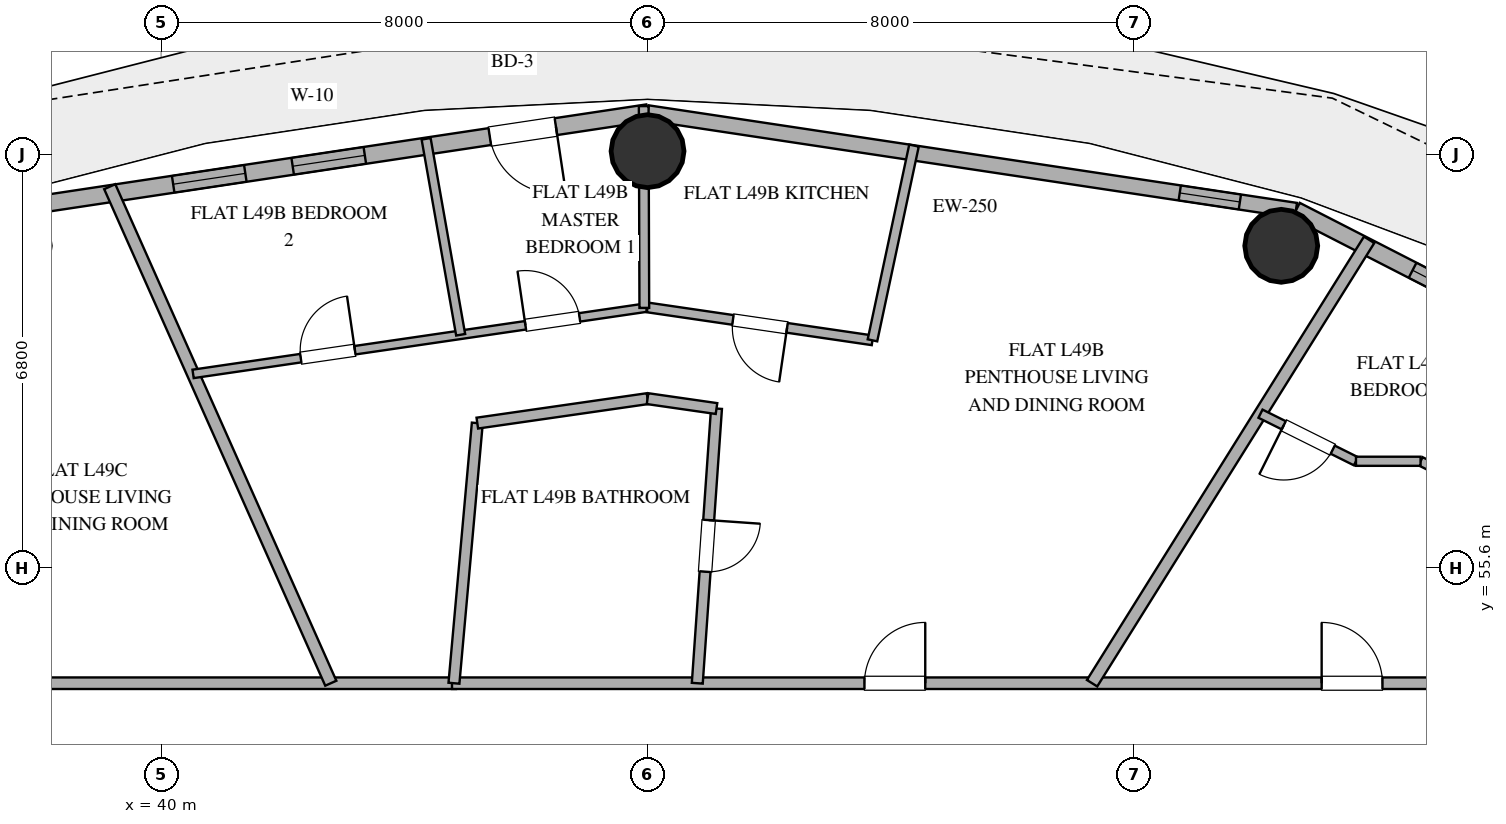
"""IFC4 building model, lengths in metres.
Left out: names, types, materials, properties, quantities, classifications, styles, units other than length and angle.
Written with IfcOpenShell. Run it as: python <this file> out.ifc"""

import sys

from ifc_helpers import new_model, si_unit, direction, frame, frame_2d, origin, origin_2d, place, context, subcontext, project, spatial, rectangle, hollow_circle, extrude, element, fill, save


model = new_model("IFC4")
c1 = context("Model", 3, precision=1e-05, world=origin(), true_north=direction((0.0, 1.0)))
c2 = subcontext(c1, "Body", "Model", "MODEL_VIEW")
j1 = project(units=[si_unit("LENGTHUNIT", "METRE"), si_unit("PLANEANGLEUNIT", "RADIAN")], contexts=[c1])
p1 = place(None, origin())
s1 = spatial("IfcSite", under=j1, at=p1, CompositionType="ELEMENT")
p2 = place(p1, origin())
s2 = spatial("IfcBuilding", under=s1, at=p2, CompositionType="ELEMENT")
p3 = place(p2, frame((0.0, 0.0, 193.8)))
s3 = spatial("IfcBuildingStorey", under=s2, at=p3, CompositionType="ELEMENT", Elevation=193.8)
for number, where, z_axis, x_axis in (
    (1, (58.422, 60.893, 0.0), (0.0, 0.0, 1.0), (1.0, 0.0, 0.0)),
    (2, (48.0, 62.45, 0.0), (0.0, 0.0, 1.0), (1.0, 0.0, 0.0)),
):
    element("IfcColumn", number, at=place(p3, frame(where, z_axis=z_axis, x_axis=x_axis)), inside=s3, PredefinedType="COLUMN", context=c2, shape_type="SweptSolid", body=[
        extrude(hollow_circle(Radius=0.6, WallThickness=0.032, at=origin_2d()), origin(), (0.0, 0.0, 1.0), 3.38),
    ])
p4 = place(p3, frame((67.576, 56.906, 0.0), z_axis=(0.0, 0.0, 1.0), x_axis=(-0.889872523182, 0.456209263919, 0.0)))
e3 = element("IfcWall", 3, at=p4, inside=s3, PredefinedType="SOLIDWALL", context=c2, shape_type="SweptSolid", body=[
    extrude(rectangle(XDim=10.016, YDim=0.28, at=frame_2d((5.008, 0.0))), origin(), (0.0, 0.0, 1.0), 3.38),
])
p5 = place(p4, frame((1.76, 0.0, 0.85)))
e4 = element("IfcOpeningElement", 4, at=p5, cuts=e3, PredefinedType="OPENING", context=c2, shape_type="SweptSolid", body=[
    extrude(rectangle(XDim=1.5, YDim=1.8, at=frame_2d((0.75, 0.9))), frame((0.0, 0.15, 0.0), z_axis=(0.0, -1.0, 0.0), x_axis=(1.0, 0.0, 0.0)), (0.0, 0.0, 1.0), 0.3),
])
p6 = place(p4, frame((4.545, 0.0, 0.85)))
e5 = element("IfcOpeningElement", 5, at=p6, cuts=e3, PredefinedType="OPENING", context=c2, shape_type="SweptSolid", body=[
    extrude(rectangle(XDim=1.35, YDim=1.8, at=frame_2d((0.675, 0.9))), frame((0.0, 0.15, 0.0), z_axis=(0.0, -1.0, 0.0), x_axis=(1.0, 0.0, 0.0)), (0.0, 0.0, 1.0), 0.3),
])
p7 = place(p4, frame((6.51, 0.0, 0.85)))
e6 = element("IfcOpeningElement", 6, at=p7, cuts=e3, PredefinedType="OPENING", context=c2, shape_type="SweptSolid", body=[
    extrude(rectangle(XDim=1.35, YDim=1.8, at=frame_2d((0.675, 0.9))), frame((0.0, 0.15, 0.0), z_axis=(0.0, -1.0, 0.0), x_axis=(1.0, 0.0, 0.0)), (0.0, 0.0, 1.0), 0.3),
])
p8 = place(p3, frame((58.663, 61.475, 0.0), z_axis=(0.0, 0.0, 1.0), x_axis=(-0.988863993413, 0.148822049884, 0.0)))
e7 = element("IfcWall", 7, at=p8, inside=s3, PredefinedType="SOLIDWALL", context=c2, shape_type="SweptSolid", body=[
    extrude(rectangle(XDim=10.783, YDim=0.25, at=frame_2d((5.392, 0.0))), origin(), (0.0, 0.0, 1.0), 3.38),
])
p9 = place(p8, frame((0.932, 0.0, 0.35)))
e8 = element("IfcOpeningElement", 8, at=p9, cuts=e7, PredefinedType="OPENING", context=c2, shape_type="SweptSolid", body=[
    extrude(rectangle(XDim=1.0, YDim=1.05, at=frame_2d((0.5, 0.525))), frame((0.0, 0.135, 0.0), z_axis=(0.0, -1.0, 0.0), x_axis=(1.0, 0.0, 0.0)), (0.0, 0.0, 1.0), 0.27),
])
p10 = place(p3, frame((48.0, 63.08, 0.0), z_axis=(0.0, 0.0, 1.0), x_axis=(-0.988863993413, -0.148822049884, 0.0)))
e9 = element("IfcWall", 9, at=p10, inside=s3, PredefinedType="SOLIDWALL", context=c2, shape_type="SweptSolid", body=[
    extrude(rectangle(XDim=10.783, YDim=0.28, at=frame_2d((5.392, 0.0))), origin(), (0.0, 0.0, 1.0), 3.38),
])
p11 = place(p10, frame((1.524, 0.0, 0.0)))
e10 = element("IfcOpeningElement", 10, at=p11, cuts=e9, PredefinedType="OPENING", context=c2, shape_type="SweptSolid", body=[
    extrude(rectangle(XDim=1.1, YDim=2.25, at=frame_2d((0.55, 1.125))), frame((0.0, 0.15, 0.0), z_axis=(0.0, -1.0, 0.0), x_axis=(1.0, 0.0, 0.0)), (0.0, 0.0, 1.0), 0.3),
])
p12 = place(p10, frame((4.702, 0.0, 0.85)))
e11 = element("IfcOpeningElement", 11, at=p12, cuts=e9, PredefinedType="OPENING", context=c2, shape_type="SweptSolid", body=[
    extrude(rectangle(XDim=1.2, YDim=1.6, at=frame_2d((0.6, 0.8))), frame((0.0, 0.15, 0.0), z_axis=(0.0, -1.0, 0.0), x_axis=(1.0, 0.0, 0.0)), (0.0, 0.0, 1.0), 0.3),
])
p13 = place(p10, frame((6.69, 0.0, 0.85)))
e12 = element("IfcOpeningElement", 12, at=p13, cuts=e9, PredefinedType="OPENING", context=c2, shape_type="SweptSolid", body=[
    extrude(rectangle(XDim=1.2, YDim=1.6, at=frame_2d((0.6, 0.8))), frame((0.0, 0.15, 0.0), z_axis=(0.0, -1.0, 0.0), x_axis=(1.0, 0.0, 0.0)), (0.0, 0.0, 1.0), 0.3),
])
p14 = place(p3, frame((32.1, 53.7, 0.0), z_axis=(0.0, 0.0, 1.0), x_axis=(1.0, 0.0, 0.0)))
e13 = element("IfcWall", 13, at=p14, inside=s3, PredefinedType="PARTITIONING", context=c2, shape_type="SweptSolid", body=[
    extrude(rectangle(XDim=12.748, YDim=0.19, at=frame_2d((6.374, 0.0))), origin(), (0.0, 0.0, 1.0), 2.74),
])
p15 = place(p14, frame((4.863, 0.0, 0.0)))
e14 = element("IfcOpeningElement", 14, at=p15, cuts=e13, PredefinedType="OPENING", context=c2, shape_type="SweptSolid", body=[
    extrude(rectangle(XDim=1.0, YDim=2.2, at=frame_2d((0.5, 1.1))), frame((0.0, 0.105, 0.0), z_axis=(0.0, -1.0, 0.0), x_axis=(1.0, 0.0, 0.0)), (0.0, 0.0, 1.0), 0.21),
])
p16 = place(p3, frame((44.784, 53.7, 0.0), z_axis=(0.0, 0.0, 1.0), x_axis=(1.0, 0.0, 0.0)))
e15 = element("IfcWall", 15, at=p16, inside=s3, PredefinedType="PARTITIONING", context=c2, shape_type="SweptSolid", body=[
    extrude(rectangle(XDim=19.116, YDim=0.19, at=frame_2d((9.558, 0.0))), origin(), (0.0, 0.0, 1.0), 2.74),
])
p17 = place(p16, frame((14.302, 0.0, 0.0)))
e16 = element("IfcOpeningElement", 16, at=p17, cuts=e15, PredefinedType="OPENING", context=c2, shape_type="SweptSolid", body=[
    extrude(rectangle(XDim=1.0, YDim=2.2, at=frame_2d((0.5, 1.1))), frame((0.0, 0.105, 0.0), z_axis=(0.0, -1.0, 0.0), x_axis=(1.0, 0.0, 0.0)), (0.0, 0.0, 1.0), 0.21),
])
p18 = place(p16, frame((6.783, 0.0, 0.0)))
e17 = element("IfcOpeningElement", 17, at=p18, cuts=e15, PredefinedType="OPENING", context=c2, shape_type="SweptSolid", body=[
    extrude(rectangle(XDim=1.0, YDim=2.2, at=frame_2d((0.5, 1.1))), frame((0.0, 0.105, 0.0), z_axis=(0.0, -1.0, 0.0), x_axis=(1.0, 0.0, 0.0)), (0.0, 0.0, 1.0), 0.21),
])
p19 = place(p3, frame((42.791, 53.7, 0.0), z_axis=(0.0, 0.0, 1.0), x_axis=(-0.406736436421, 0.913545549651, 0.0)))
e18 = element("IfcWall", 18, at=p19, inside=s3, PredefinedType="PARTITIONING", context=c2, shape_type="SweptSolid", body=[
    extrude(rectangle(XDim=8.939, YDim=0.2, at=frame_2d((4.469, 0.0))), origin(), (0.0, 0.0, 1.0), 2.74),
])
p20 = place(p3, frame((55.311, 53.7, 0.0), z_axis=(0.0, 0.0, 1.0), x_axis=(0.529914717401, 0.848050937315, 0.0)))
e19 = element("IfcWall", 19, at=p20, inside=s3, PredefinedType="PARTITIONING", context=c2, shape_type="SweptSolid", body=[
    extrude(rectangle(XDim=8.599, YDim=0.2, at=frame_2d((4.299, 0.0))), origin(), (0.0, 0.0, 1.0), 2.74),
])
p21 = place(p3, frame((49.134, 58.217, 0.0), z_axis=(0.0, 0.0, 1.0), x_axis=(-0.069767962458, -0.997563246824, 0.0)))
e20 = element("IfcWall", 20, at=p21, inside=s3, PredefinedType="PLUMBINGWALL", context=c2, shape_type="SweptSolid", body=[
    extrude(rectangle(XDim=4.528, YDim=0.18, at=frame_2d((2.264, 0.0))), origin(), (0.0, 0.0, 1.0), 2.74),
])
p22 = place(p21, frame((1.839, 0.0, 0.0)))
e21 = element("IfcOpeningElement", 21, at=p22, cuts=e20, PredefinedType="OPENING", context=c2, shape_type="SweptSolid", body=[
    extrude(rectangle(XDim=0.85, YDim=2.1, at=frame_2d((0.425, 1.05))), frame((0.0, 0.1, 0.0), z_axis=(0.0, -1.0, 0.0), x_axis=(1.0, 0.0, 0.0)), (0.0, 0.0, 1.0), 0.2),
])
p23 = place(p3, frame((40.526, 58.787, 0.0), z_axis=(0.0, 0.0, 1.0), x_axis=(0.989472726968, 0.144719461672, 0.0)))
e22 = element("IfcWall", 22, at=p23, inside=s3, PredefinedType="PARTITIONING", context=c2, shape_type="SweptSolid", body=[
    extrude(rectangle(XDim=7.532, YDim=0.14, at=frame_2d((3.766, 0.0))), origin(), (0.0, 0.0, 1.0), 2.74),
])
p24 = place(p23, frame((1.79, 0.0, 0.0)))
e23 = element("IfcOpeningElement", 23, at=p24, cuts=e22, PredefinedType="OPENING", context=c2, shape_type="SweptSolid", body=[
    extrude(rectangle(XDim=0.9, YDim=2.1, at=frame_2d((0.45, 1.05))), frame((0.0, 0.08, 0.0), z_axis=(0.0, -1.0, 0.0), x_axis=(1.0, 0.0, 0.0)), (0.0, 0.0, 1.0), 0.16),
])
p25 = place(p23, frame((5.524, 0.0, 0.0)))
e24 = element("IfcOpeningElement", 24, at=p25, cuts=e22, PredefinedType="OPENING", context=c2, shape_type="SweptSolid", body=[
    extrude(rectangle(XDim=0.9, YDim=2.1, at=frame_2d((0.45, 1.05))), frame((0.0, 0.08, 0.0), z_axis=(0.0, -1.0, 0.0), x_axis=(1.0, 0.0, 0.0)), (0.0, 0.0, 1.0), 0.16),
])
p26 = place(p3, frame((44.816, 53.7, 0.0), z_axis=(0.0, 0.0, 1.0), x_axis=(0.089418344166, 0.995994156472, 0.0)))
e25 = element("IfcWall", 25, at=p26, inside=s3, PredefinedType="PLUMBINGWALL", context=c2, shape_type="SweptSolid", body=[
    extrude(rectangle(XDim=4.295, YDim=0.18, at=frame_2d((2.147, 0.0))), origin(), (0.0, 0.0, 1.0), 2.74),
])
p27 = place(p3, frame((51.699, 59.339, 0.0), z_axis=(0.0, 0.0, 1.0), x_axis=(-0.98948182168, 0.144657265858, 0.0)))
e26 = element("IfcWall", 26, at=p27, inside=s3, PredefinedType="PLUMBINGWALL", context=c2, shape_type="SweptSolid", body=[
    extrude(rectangle(XDim=3.738, YDim=0.16, at=frame_2d((1.869, 0.0))), origin(), (0.0, 0.0, 1.0), 2.74),
])
p28 = place(p27, frame((1.419, 0.0, 0.0)))
e27 = element("IfcOpeningElement", 27, at=p28, cuts=e26, PredefinedType="OPENING", context=c2, shape_type="SweptSolid", body=[
    extrude(rectangle(XDim=0.9, YDim=2.1, at=frame_2d((0.45, 1.05))), frame((0.0, 0.09, 0.0), z_axis=(0.0, -1.0, 0.0), x_axis=(1.0, 0.0, 0.0)), (0.0, 0.0, 1.0), 0.18),
])
p29 = place(p3, frame((47.947, 59.872, 0.0), z_axis=(0.0, 0.0, 1.0), x_axis=(-0.003016466559, 0.999995450454, 0.0)))
e28 = element("IfcWall", 28, at=p29, inside=s3, PredefinedType="PLUMBINGWALL", context=c2, shape_type="SweptSolid", body=[
    extrude(rectangle(XDim=3.318, YDim=0.16, at=frame_2d((1.659, 0.0))), origin(), (0.0, 0.0, 1.0), 2.74),
])
p30 = place(p3, frame((52.382, 62.542, 0.0), z_axis=(0.0, 0.0, 1.0), x_axis=(-0.208602341862, -0.97800054344, 0.0)))
e29 = element("IfcWall", 29, at=p30, inside=s3, PredefinedType="PLUMBINGWALL", context=c2, shape_type="SweptSolid", body=[
    extrude(rectangle(XDim=3.275, YDim=0.16, at=frame_2d((1.637, 0.0))), origin(), (0.0, 0.0, 1.0), 2.74),
])
p31 = place(p3, frame((44.927, 59.43, 0.0), z_axis=(0.0, 0.0, 1.0), x_axis=(-0.17359807558, 0.984816586048, 0.0)))
e30 = element("IfcWall", 30, at=p31, inside=s3, PredefinedType="PARTITIONING", context=c2, shape_type="SweptSolid", body=[
    extrude(rectangle(XDim=3.273, YDim=0.15, at=frame_2d((1.636, 0.0))), origin(), (0.0, 0.0, 1.0), 2.74),
])
p32 = place(p3, frame((45.2, 57.978, 0.0), z_axis=(0.0, 0.0, 1.0), x_axis=(0.98983176764, 0.142243002535, 0.0)))
e31 = element("IfcWall", 31, at=p32, inside=s3, PredefinedType="PLUMBINGWALL", context=c2, shape_type="SweptSolid", body=[
    extrude(rectangle(XDim=2.829, YDim=0.18, at=frame_2d((1.414, 0.0))), origin(), (0.0, 0.0, 1.0), 2.74),
])
p33 = place(p3, frame((59.651, 57.35, 0.0), z_axis=(0.0, 0.0, 1.0), x_axis=(-0.895038630404, 0.445988621027, 0.0)))
e32 = element("IfcWall", 32, at=p33, inside=s3, PredefinedType="PARTITIONING", context=c2, shape_type="SweptSolid", body=[
    extrude(rectangle(XDim=1.754, YDim=0.15, at=frame_2d((0.877, 0.0))), origin(), (0.0, 0.0, 1.0), 2.74),
])
p34 = place(p33, frame((0.427, 0.0, 0.0)))
e33 = element("IfcOpeningElement", 33, at=p34, cuts=e32, PredefinedType="OPENING", context=c2, shape_type="SweptSolid", body=[
    extrude(rectangle(XDim=0.9, YDim=2.1, at=frame_2d((0.45, 1.05))), frame((0.0, 0.085, 0.0), z_axis=(0.0, -1.0, 0.0), x_axis=(1.0, 0.0, 0.0)), (0.0, 0.0, 1.0), 0.17),
])
p35 = place(p3, frame((62.278, 56.57, 0.0), z_axis=(0.0, 0.0, 1.0), x_axis=(-0.894929238491, 0.446208088333, 0.0)))
e34 = element("IfcWall", 34, at=p35, inside=s3, PredefinedType="PARTITIONING", context=c2, shape_type="SweptSolid", body=[
    extrude(rectangle(XDim=1.749, YDim=0.15, at=frame_2d((0.875, 0.0))), origin(), (0.0, 0.0, 1.0), 2.74),
])
p36 = place(p3, frame((48.0, 58.38, 0.0), z_axis=(0.0, 0.0, 1.0), x_axis=(0.989846946984, -0.142137333399, 0.0)))
e35 = element("IfcWall", 35, at=p36, inside=s3, PredefinedType="PLUMBINGWALL", context=c2, shape_type="SweptSolid", body=[
    extrude(rectangle(XDim=1.146, YDim=0.18, at=frame_2d((0.573, 0.0))), origin(), (0.0, 0.0, 1.0), 2.74),
])
p37 = place(p3, frame((60.713, 57.35, 0.0), z_axis=(0.0, 0.0, 1.0), x_axis=(-1.0, 0.0, 0.0)))
e36 = element("IfcWall", 36, at=p37, inside=s3, PredefinedType="PARTITIONING", context=c2, shape_type="SweptSolid", body=[
    extrude(rectangle(XDim=1.062, YDim=0.15, at=frame_2d((0.531, 0.0))), origin(), (0.0, 0.0, 1.0), 2.74),
])
p38 = place(p7, origin())
e37 = element("IfcWindow", 37, at=p38, inside=s3, PartitioningType="SINGLE_PANEL", PredefinedType="WINDOW", context=c2, shape_type="SweptSolid", body=[
    extrude(rectangle(XDim=1.35, YDim=1.8, at=frame_2d((0.675, 0.9))), frame((0.0, 0.03, 0.0), z_axis=(0.0, -1.0, 0.0), x_axis=(1.0, 0.0, 0.0)), (0.0, 0.0, 1.0), 0.06),
])
fill(e6, e37)
p39 = place(p11, origin())
e38 = element("IfcDoor", 38, at=p39, inside=s3, OperationType="SINGLE_SWING_LEFT", PredefinedType="DOOR", context=c2, shape_type="SweptSolid", body=[
    extrude(rectangle(XDim=1.1, YDim=2.25, at=frame_2d((0.55, 1.125))), frame((0.0, 0.025, 0.0), z_axis=(0.0, -1.0, 0.0), x_axis=(1.0, 0.0, 0.0)), (0.0, 0.0, 1.0), 0.05),
])
fill(e10, e38)
p40 = place(p12, origin())
e39 = element("IfcWindow", 39, at=p40, inside=s3, PartitioningType="SINGLE_PANEL", PredefinedType="WINDOW", context=c2, shape_type="SweptSolid", body=[
    extrude(rectangle(XDim=1.2, YDim=1.6, at=frame_2d((0.6, 0.8))), frame((0.0, 0.03, 0.0), z_axis=(0.0, -1.0, 0.0), x_axis=(1.0, 0.0, 0.0)), (0.0, 0.0, 1.0), 0.06),
])
fill(e11, e39)
p41 = place(p13, origin())
e40 = element("IfcWindow", 40, at=p41, inside=s3, PartitioningType="SINGLE_PANEL", PredefinedType="WINDOW", context=c2, shape_type="SweptSolid", body=[
    extrude(rectangle(XDim=1.2, YDim=1.6, at=frame_2d((0.6, 0.8))), frame((0.0, 0.03, 0.0), z_axis=(0.0, -1.0, 0.0), x_axis=(1.0, 0.0, 0.0)), (0.0, 0.0, 1.0), 0.06),
])
fill(e12, e40)
p42 = place(p9, origin())
e41 = element("IfcWindow", 41, at=p42, inside=s3, PartitioningType="SINGLE_PANEL", PredefinedType="WINDOW", context=c2, shape_type="SweptSolid", body=[
    extrude(rectangle(XDim=1.0, YDim=1.05, at=frame_2d((0.5, 0.525))), frame((0.0, 0.03, 0.0), z_axis=(0.0, -1.0, 0.0), x_axis=(1.0, 0.0, 0.0)), (0.0, 0.0, 1.0), 0.06),
])
fill(e8, e41)
p43 = place(p17, origin())
e42 = element("IfcDoor", 42, at=p43, inside=s3, OperationType="SINGLE_SWING_LEFT", PredefinedType="DOOR", context=c2, shape_type="SweptSolid", body=[
    extrude(rectangle(XDim=1.0, YDim=2.2, at=frame_2d((0.5, 1.1))), frame((0.0, 0.025, 0.0), z_axis=(0.0, -1.0, 0.0), x_axis=(1.0, 0.0, 0.0)), (0.0, 0.0, 1.0), 0.05),
])
fill(e16, e42)
p44 = place(p18, origin())
e43 = element("IfcDoor", 43, at=p44, inside=s3, OperationType="SINGLE_SWING_RIGHT", PredefinedType="DOOR", context=c2, shape_type="SweptSolid", body=[
    extrude(rectangle(XDim=1.0, YDim=2.2, at=frame_2d((0.5, 1.1))), frame((0.0, 0.025, 0.0), z_axis=(0.0, -1.0, 0.0), x_axis=(1.0, 0.0, 0.0)), (0.0, 0.0, 1.0), 0.05),
])
fill(e17, e43)
p45 = place(p22, origin())
e44 = element("IfcDoor", 44, at=p45, inside=s3, OperationType="SINGLE_SWING_LEFT", PredefinedType="DOOR", context=c2, shape_type="SweptSolid", body=[
    extrude(rectangle(XDim=0.85, YDim=2.1, at=frame_2d((0.425, 1.05))), frame((0.0, 0.025, 0.0), z_axis=(0.0, -1.0, 0.0), x_axis=(1.0, 0.0, 0.0)), (0.0, 0.0, 1.0), 0.05),
])
fill(e21, e44)
p46 = place(p24, origin())
e45 = element("IfcDoor", 45, at=p46, inside=s3, OperationType="SINGLE_SWING_RIGHT", PredefinedType="DOOR", context=c2, shape_type="SweptSolid", body=[
    extrude(rectangle(XDim=0.9, YDim=2.1, at=frame_2d((0.45, 1.05))), frame((0.0, 0.025, 0.0), z_axis=(0.0, -1.0, 0.0), x_axis=(1.0, 0.0, 0.0)), (0.0, 0.0, 1.0), 0.05),
])
fill(e23, e45)
p47 = place(p25, origin())
e46 = element("IfcDoor", 46, at=p47, inside=s3, OperationType="SINGLE_SWING_LEFT", PredefinedType="DOOR", context=c2, shape_type="SweptSolid", body=[
    extrude(rectangle(XDim=0.9, YDim=2.1, at=frame_2d((0.45, 1.05))), frame((0.0, 0.025, 0.0), z_axis=(0.0, -1.0, 0.0), x_axis=(1.0, 0.0, 0.0)), (0.0, 0.0, 1.0), 0.05),
])
fill(e24, e46)
p48 = place(p28, origin())
e47 = element("IfcDoor", 47, at=p48, inside=s3, OperationType="SINGLE_SWING_LEFT", PredefinedType="DOOR", context=c2, shape_type="SweptSolid", body=[
    extrude(rectangle(XDim=0.9, YDim=2.1, at=frame_2d((0.45, 1.05))), frame((0.0, 0.025, 0.0), z_axis=(0.0, -1.0, 0.0), x_axis=(1.0, 0.0, 0.0)), (0.0, 0.0, 1.0), 0.05),
])
fill(e27, e47)
p49 = place(p34, origin())
e48 = element("IfcDoor", 48, at=p49, inside=s3, OperationType="SINGLE_SWING_RIGHT", PredefinedType="DOOR", context=c2, shape_type="SweptSolid", body=[
    extrude(rectangle(XDim=0.9, YDim=2.1, at=frame_2d((0.45, 1.05))), frame((0.0, 0.025, 0.0), z_axis=(0.0, -1.0, 0.0), x_axis=(1.0, 0.0, 0.0)), (0.0, 0.0, 1.0), 0.05),
])
fill(e33, e48)
save(model, sys.argv[1])
